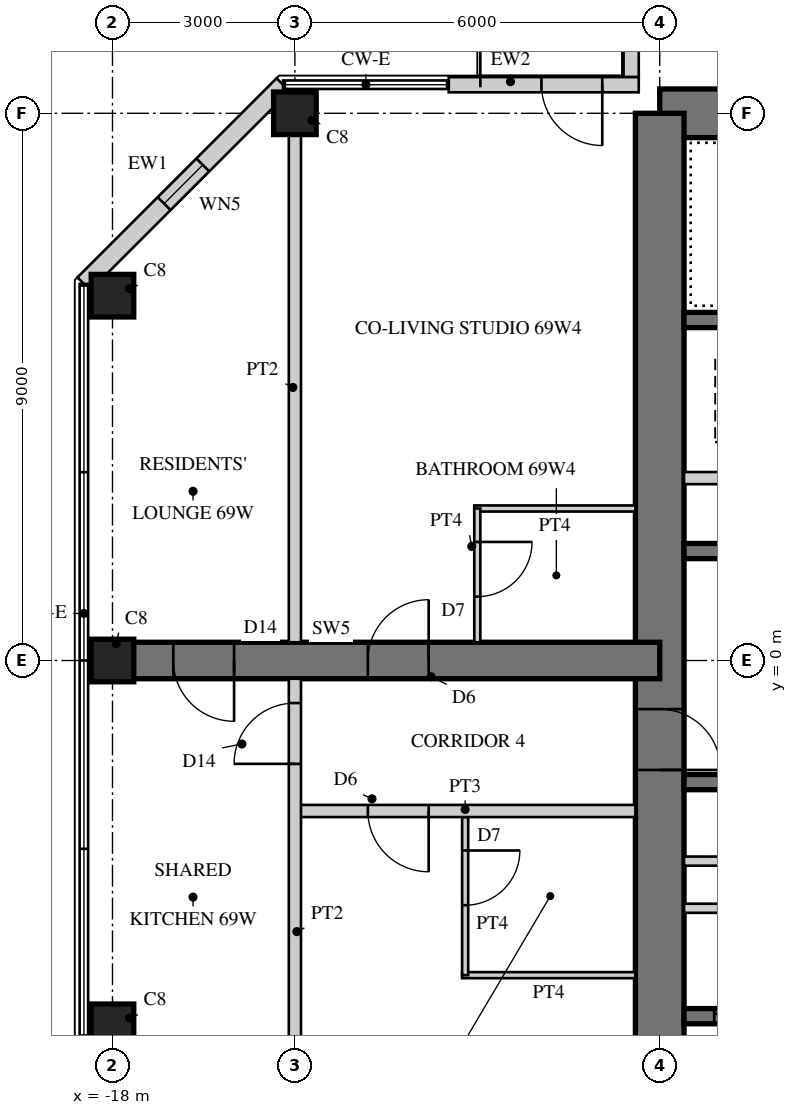
"""IFC4 building model, lengths in metres.
Left out: names, types, materials, properties, quantities, classifications, styles, units other than length and angle.
Written with IfcOpenShell. Run it as: python <this file> out.ifc"""

import sys

from ifc_helpers import new_model, si_unit, direction, frame, frame_2d, origin, origin_2d, place, context, subcontext, project, spatial, rectangle, hollow_rectangle, extrude, element, fill, save


model = new_model("IFC4")
c1 = context("Model", 3, precision=1e-05, world=origin(), true_north=direction((0.0, 1.0)))
c2 = subcontext(c1, "Body", "Model", "MODEL_VIEW")
j1 = project(units=[si_unit("LENGTHUNIT", "METRE"), si_unit("PLANEANGLEUNIT", "RADIAN")], contexts=[c1])
p1 = place(None, origin())
s1 = spatial("IfcSite", under=j1, at=p1, CompositionType="ELEMENT")
p2 = place(p1, origin())
s2 = spatial("IfcBuilding", under=s1, at=p2, CompositionType="ELEMENT")
p3 = place(p2, frame((0.0, 0.0, 267.9)))
s3 = spatial("IfcBuildingStorey", under=s2, at=p3, CompositionType="ELEMENT", Elevation=267.9)
p4 = place(p3, frame((9.0, 9.0, 0.0), z_axis=(0.0, 0.0, 1.0), x_axis=(-1.0, 0.0, 0.0)))
e1 = element("IfcWall", 1, at=p4, inside=s3, PredefinedType="SHEAR", context=c2, shape_type="SweptSolid", body=[
    extrude(rectangle(XDim=18.0, YDim=0.8, at=frame_2d((9.0, 0.0))), origin(), (0.0, 0.0, 1.0), 3.4),
])
p5 = place(p4, frame((9.8, 0.0, 0.0)))
e2 = element("IfcOpeningElement", 2, at=p5, cuts=e1, PredefinedType="OPENING", context=c2, shape_type="SweptSolid", body=[
    extrude(rectangle(XDim=1.0, YDim=2.4, at=frame_2d((0.5, 1.2))), frame((0.0, 0.41, 0.0), z_axis=(0.0, -1.0, 0.0), x_axis=(1.0, 0.0, 0.0)), (0.0, 0.0, 1.0), 0.82),
])
p6 = place(p3, frame((-9.0, 9.0, 0.0), z_axis=(0.0, 0.0, 1.0), x_axis=(0.0, -1.0, 0.0)))
e3 = element("IfcWall", 3, at=p6, inside=s3, PredefinedType="SHEAR", context=c2, shape_type="SweptSolid", body=[
    extrude(rectangle(XDim=18.0, YDim=0.8, at=frame_2d((9.0, 0.0))), origin(), (0.0, 0.0, 1.0), 3.4),
])
p7 = place(p6, frame((9.8, 0.0, 0.0)))
e4 = element("IfcOpeningElement", 4, at=p7, cuts=e3, PredefinedType="OPENING", context=c2, shape_type="SweptSolid", body=[
    extrude(rectangle(XDim=1.0, YDim=2.4, at=frame_2d((0.5, 1.2))), frame((0.0, 0.41, 0.0), z_axis=(0.0, -1.0, 0.0), x_axis=(1.0, 0.0, 0.0)), (0.0, 0.0, 1.0), 0.82),
])
p8 = place(p3, frame((-2.125, 1.8, 0.0), z_axis=(0.0, 0.0, 1.0), x_axis=(-1.0, 0.0, 0.0)))
e5 = element("IfcWall", 5, at=p8, inside=s3, PredefinedType="SHEAR", context=c2, shape_type="SweptSolid", body=[
    extrude(rectangle(XDim=6.475, YDim=0.25, at=frame_2d((3.238, 0.0))), origin(), (0.0, 0.0, 1.0), 3.4),
])
p9 = place(p3, frame((-2.125, 5.6, 0.0), z_axis=(0.0, 0.0, 1.0), x_axis=(-1.0, 0.0, 0.0)))
e6 = element("IfcWall", 6, at=p9, inside=s3, PredefinedType="SHEAR", context=c2, shape_type="SweptSolid", body=[
    extrude(rectangle(XDim=6.475, YDim=0.25, at=frame_2d((3.238, 0.0))), origin(), (0.0, 0.0, 1.0), 3.4),
])
p10 = place(p9, frame((0.175, 0.0, 0.0)))
e7 = element("IfcOpeningElement", 7, at=p10, cuts=e6, PredefinedType="OPENING", context=c2, shape_type="SweptSolid", body=[
    extrude(rectangle(XDim=1.0, YDim=2.1, at=frame_2d((0.5, 1.05))), frame((0.0, 0.135, 0.0), z_axis=(0.0, -1.0, 0.0), x_axis=(1.0, 0.0, 0.0)), (0.0, 0.0, 1.0), 0.27),
])
p11 = place(p3, frame((-5.725, 3.0, 0.0), z_axis=(0.0, 0.0, 1.0), x_axis=(-1.0, 0.0, 0.0)))
e8 = element("IfcWall", 8, at=p11, inside=s3, PredefinedType="PARTITIONING", context=c2, shape_type="SweptSolid", body=[
    extrude(rectangle(XDim=2.875, YDim=0.2, at=frame_2d((1.438, 0.0))), origin(), (0.0, 0.0, 1.0), 3.4),
])
p12 = place(p3, frame((-1.925, -2.0, 0.0), z_axis=(0.0, 0.0, 1.0), x_axis=(-1.0, 0.0, 0.0)))
e9 = element("IfcWall", 9, at=p12, inside=s3, PredefinedType="SHEAR", context=c2, shape_type="SweptSolid", body=[
    extrude(rectangle(XDim=6.675, YDim=0.25, at=frame_2d((3.337, 0.0))), origin(), (0.0, 0.0, 1.0), 3.4),
])
p13 = place(p3, frame((-1.925, -5.85, 0.0), z_axis=(0.0, 0.0, 1.0), x_axis=(-1.0, 0.0, 0.0)))
e10 = element("IfcWall", 10, at=p13, inside=s3, PredefinedType="SHEAR", context=c2, shape_type="SweptSolid", body=[
    extrude(rectangle(XDim=6.675, YDim=0.25, at=frame_2d((3.337, 0.0))), origin(), (0.0, 0.0, 1.0), 3.4),
])
p14 = place(p13, frame((0.496, 0.0, 0.0)))
e11 = element("IfcOpeningElement", 11, at=p14, cuts=e10, PredefinedType="OPENING", context=c2, shape_type="SweptSolid", body=[
    extrude(rectangle(XDim=1.1, YDim=2.2, at=frame_2d((0.55, 1.1))), frame((0.0, 0.135, 0.0), z_axis=(0.0, -1.0, 0.0), x_axis=(1.0, 0.0, 0.0)), (0.0, 0.0, 1.0), 0.27),
])
p15 = place(p13, frame((2.788, 0.0, 0.0)))
e12 = element("IfcOpeningElement", 12, at=p15, cuts=e10, PredefinedType="OPENING", context=c2, shape_type="SweptSolid", body=[
    extrude(rectangle(XDim=1.1, YDim=2.2, at=frame_2d((0.55, 1.1))), frame((0.0, 0.135, 0.0), z_axis=(0.0, -1.0, 0.0), x_axis=(1.0, 0.0, 0.0)), (0.0, 0.0, 1.0), 0.27),
])
p16 = place(p13, frame((5.079, 0.0, 0.0)))
e13 = element("IfcOpeningElement", 13, at=p16, cuts=e10, PredefinedType="OPENING", context=c2, shape_type="SweptSolid", body=[
    extrude(rectangle(XDim=1.1, YDim=2.2, at=frame_2d((0.55, 1.1))), frame((0.0, 0.135, 0.0), z_axis=(0.0, -1.0, 0.0), x_axis=(1.0, 0.0, 0.0)), (0.0, 0.0, 1.0), 0.27),
])
p17 = place(p3, frame((-1.925, -3.3, 0.0), z_axis=(0.0, 0.0, 1.0), x_axis=(-1.0, 0.0, 0.0)))
e14 = element("IfcWall", 14, at=p17, inside=s3, PredefinedType="PARTITIONING", context=c2, shape_type="SweptSolid", body=[
    extrude(rectangle(XDim=6.675, YDim=0.15, at=frame_2d((3.337, 0.0))), origin(), (0.0, 0.0, 1.0), 3.4),
])
p18 = place(p17, frame((0.075, 0.0, 0.0)))
e15 = element("IfcOpeningElement", 15, at=p18, cuts=e14, PredefinedType="OPENING", context=c2, shape_type="SweptSolid", body=[
    extrude(rectangle(XDim=0.8, YDim=2.1, at=frame_2d((0.4, 1.05))), frame((0.0, 0.085, 0.0), z_axis=(0.0, -1.0, 0.0), x_axis=(1.0, 0.0, 0.0)), (0.0, 0.0, 1.0), 0.17),
])
p19 = place(p17, frame((3.675, 0.0, 0.0)))
e16 = element("IfcOpeningElement", 16, at=p19, cuts=e14, PredefinedType="OPENING", context=c2, shape_type="SweptSolid", body=[
    extrude(rectangle(XDim=0.8, YDim=2.1, at=frame_2d((0.4, 1.05))), frame((0.0, 0.085, 0.0), z_axis=(0.0, -1.0, 0.0), x_axis=(1.0, 0.0, 0.0)), (0.0, 0.0, 1.0), 0.17),
])
p20 = place(p3, frame((-9.0, 0.0, 0.0), z_axis=(0.0, 0.0, 1.0), x_axis=(-1.0, 0.0, 0.0)))
e17 = element("IfcWall", 17, at=p20, inside=s3, PredefinedType="SHEAR", context=c2, shape_type="SweptSolid", body=[
    extrude(rectangle(XDim=9.0, YDim=0.6, at=frame_2d((4.5, 0.0))), origin(), (0.0, 0.0, 1.0), 3.4),
])
p21 = place(p20, frame((3.8, 0.0, 0.0)))
e18 = element("IfcOpeningElement", 18, at=p21, cuts=e17, PredefinedType="OPENING", context=c2, shape_type="SweptSolid", body=[
    extrude(rectangle(XDim=1.0, YDim=2.15, at=frame_2d((0.5, 1.075))), frame((0.0, 0.31, 0.0), z_axis=(0.0, -1.0, 0.0), x_axis=(1.0, 0.0, 0.0)), (0.0, 0.0, 1.0), 0.62),
])
p22 = place(p20, frame((7.0, 0.0, 0.0)))
e19 = element("IfcOpeningElement", 19, at=p22, cuts=e17, PredefinedType="OPENING", context=c2, shape_type="SweptSolid", body=[
    extrude(rectangle(XDim=1.0, YDim=2.2, at=frame_2d((0.5, 1.1))), frame((0.0, 0.31, 0.0), z_axis=(0.0, -1.0, 0.0), x_axis=(1.0, 0.0, 0.0)), (0.0, 0.0, 1.0), 0.62),
])
for number, where, z_axis, x_axis in (
    (20, (-15.0, 9.0, 0.0), (0.0, 0.0, 1.0), (1.0, 0.0, 0.0)),
    (21, (-18.0, 6.0, 0.0), (0.0, 0.0, 1.0), (1.0, 0.0, 0.0)),
    (22, (-18.0, 0.0, 0.0), (0.0, 0.0, 1.0), (1.0, 0.0, 0.0)),
    (23, (-18.0, -6.0, 0.0), (0.0, 0.0, 1.0), (1.0, 0.0, 0.0)),
):
    element("IfcColumn", number, at=place(p3, frame(where, z_axis=z_axis, x_axis=x_axis)), inside=s3, PredefinedType="COLUMN", context=c2, shape_type="SweptSolid", body=[
        extrude(rectangle(XDim=0.7, YDim=0.7, at=origin_2d()), origin(), (0.0, 0.0, 1.0), 3.4),
    ])
p23 = place(p3, frame((-9.47, 12.47, 0.0), z_axis=(0.0, 0.0, 1.0), x_axis=(0.0, -1.0, 0.0)))
e24 = element("IfcWall", 24, at=p23, inside=s3, PredefinedType="SOLIDWALL", context=c2, shape_type="SweptSolid", body=[
    extrude(rectangle(XDim=2.875, YDim=0.25, at=frame_2d((1.438, 0.0))), origin(), (0.0, 0.0, 1.0), 3.22),
])
p24 = place(p23, frame((0.6, 0.0, 0.0)))
e25 = element("IfcOpeningElement", 25, at=p24, cuts=e24, PredefinedType="OPENING", context=c2, shape_type="SweptSolid", body=[
    extrude(rectangle(XDim=1.0, YDim=2.2, at=frame_2d((0.5, 1.1))), frame((0.0, 0.135, 0.0), z_axis=(0.0, -1.0, 0.0), x_axis=(1.0, 0.0, 0.0)), (0.0, 0.0, 1.0), 0.27),
])
p25 = place(p3, frame((-9.345, 9.47, 0.0), z_axis=(0.0, 0.0, 1.0), x_axis=(-1.0, 0.0, 0.0)))
e26 = element("IfcWall", 26, at=p25, inside=s3, PredefinedType="SOLIDWALL", context=c2, shape_type="SweptSolid", body=[
    extrude(rectangle(XDim=3.125, YDim=0.25, at=frame_2d((1.562, 0.0))), origin(), (0.0, 0.0, 1.0), 3.22),
])
p26 = place(p25, frame((0.6, 0.0, 0.0)))
e27 = element("IfcOpeningElement", 27, at=p26, cuts=e26, PredefinedType="OPENING", context=c2, shape_type="SweptSolid", body=[
    extrude(rectangle(XDim=1.0, YDim=2.2, at=frame_2d((0.5, 1.1))), frame((0.0, 0.135, 0.0), z_axis=(0.0, -1.0, 0.0), x_axis=(1.0, 0.0, 0.0)), (0.0, 0.0, 1.0), 0.27),
])
p27 = place(p3, frame((-15.195, 9.47, 0.0), z_axis=(0.0, 0.0, 1.0), x_axis=(-0.707106781187, -0.707106781187, 0.0)))
e28 = element("IfcWall", 28, at=p27, inside=s3, PredefinedType="SOLIDWALL", context=c2, shape_type="SweptSolid", body=[
    extrude(rectangle(XDim=4.632, YDim=0.3, at=frame_2d((2.316, 0.0))), origin(), (0.0, 0.0, 1.0), 3.22),
])
p28 = place(p27, frame((1.866, 0.0, 0.3)))
e29 = element("IfcOpeningElement", 29, at=p28, cuts=e28, PredefinedType="OPENING", context=c2, shape_type="SweptSolid", body=[
    extrude(rectangle(XDim=0.9, YDim=2.4, at=frame_2d((0.45, 1.2))), frame((0.0, 0.16, 0.0), z_axis=(0.0, -1.0, 0.0), x_axis=(1.0, 0.0, 0.0)), (0.0, 0.0, 1.0), 0.32),
])
p29 = place(p3, frame((-18.47, -6.195, 0.0), z_axis=(0.0, 0.0, 1.0), x_axis=(0.707106781187, -0.707106781187, 0.0)))
e30 = element("IfcWall", 30, at=p29, inside=s3, PredefinedType="SOLIDWALL", context=c2, shape_type="SweptSolid", body=[
    extrude(rectangle(XDim=4.632, YDim=0.3, at=frame_2d((2.316, 0.0))), origin(), (0.0, 0.0, 1.0), 3.22),
])
p30 = place(p29, frame((1.866, 0.0, 0.3)))
e31 = element("IfcOpeningElement", 31, at=p30, cuts=e30, PredefinedType="OPENING", context=c2, shape_type="SweptSolid", body=[
    extrude(rectangle(XDim=0.9, YDim=2.4, at=frame_2d((0.45, 1.2))), frame((0.0, 0.16, 0.0), z_axis=(0.0, -1.0, 0.0), x_axis=(1.0, 0.0, 0.0)), (0.0, 0.0, 1.0), 0.32),
])
p31 = place(p3, frame((-3.325, -4.075, 0.0), z_axis=(0.0, 0.0, 1.0), x_axis=(-1.0, 0.0, 0.0)))
e32 = element("IfcWall", 32, at=p31, inside=s3, PredefinedType="PARTITIONING", context=c2, shape_type="SweptSolid", body=[
    extrude(rectangle(XDim=5.275, YDim=0.15, at=frame_2d((2.638, 0.0))), origin(), (0.0, 0.0, 1.0), 3.22),
])
p32 = place(p31, frame((2.137, 0.0, 0.0)))
e33 = element("IfcOpeningElement", 33, at=p32, cuts=e32, PredefinedType="OPENING", context=c2, shape_type="SweptSolid", body=[
    extrude(rectangle(XDim=1.0, YDim=2.1, at=frame_2d((0.5, 1.05))), frame((0.0, 0.085, 0.0), z_axis=(0.0, -1.0, 0.0), x_axis=(1.0, 0.0, 0.0)), (0.0, 0.0, 1.0), 0.17),
])
p33 = place(p3, frame((-9.4, -5.175, 0.0), z_axis=(0.0, 0.0, 1.0), x_axis=(-1.0, 0.0, 0.0)))
e34 = element("IfcWall", 34, at=p33, inside=s3, PredefinedType="PARTITIONING", context=c2, shape_type="SweptSolid", body=[
    extrude(rectangle(XDim=2.85, YDim=0.1, at=frame_2d((1.425, 0.0))), origin(), (0.0, 0.0, 1.0), 3.22),
])
p34 = place(p3, frame((-12.2, -2.575, 0.0), z_axis=(0.0, 0.0, 1.0), x_axis=(0.0, -1.0, 0.0)))
e35 = element("IfcWall", 35, at=p34, inside=s3, PredefinedType="PARTITIONING", context=c2, shape_type="SweptSolid", body=[
    extrude(rectangle(XDim=2.6, YDim=0.1, at=frame_2d((1.3, 0.0))), origin(), (0.0, 0.0, 1.0), 3.22),
])
p35 = place(p34, frame((0.55, 0.0, 0.0)))
e36 = element("IfcOpeningElement", 36, at=p35, cuts=e35, PredefinedType="OPENING", context=c2, shape_type="SweptSolid", body=[
    extrude(rectangle(XDim=0.9, YDim=2.1, at=frame_2d((0.45, 1.05))), frame((0.0, 0.06, 0.0), z_axis=(0.0, -1.0, 0.0), x_axis=(1.0, 0.0, 0.0)), (0.0, 0.0, 1.0), 0.12),
])
p36 = place(p3, frame((-9.4, 2.5, 0.0), z_axis=(0.0, 0.0, 1.0), x_axis=(-1.0, 0.0, 0.0)))
e37 = element("IfcWall", 37, at=p36, inside=s3, PredefinedType="PARTITIONING", context=c2, shape_type="SweptSolid", body=[
    extrude(rectangle(XDim=2.65, YDim=0.1, at=frame_2d((1.325, 0.0))), origin(), (0.0, 0.0, 1.0), 3.22),
])
p37 = place(p3, frame((-12.0, 2.5, 0.0), z_axis=(0.0, 0.0, 1.0), x_axis=(0.0, -1.0, 0.0)))
e38 = element("IfcWall", 38, at=p37, inside=s3, PredefinedType="PARTITIONING", context=c2, shape_type="SweptSolid", body=[
    extrude(rectangle(XDim=2.2, YDim=0.1, at=frame_2d((1.1, 0.0))), origin(), (0.0, 0.0, 1.0), 3.22),
])
p38 = place(p37, frame((0.55, 0.0, 0.0)))
e39 = element("IfcOpeningElement", 39, at=p38, cuts=e38, PredefinedType="OPENING", context=c2, shape_type="SweptSolid", body=[
    extrude(rectangle(XDim=0.9, YDim=2.1, at=frame_2d((0.45, 1.05))), frame((0.0, 0.06, 0.0), z_axis=(0.0, -1.0, 0.0), x_axis=(1.0, 0.0, 0.0)), (0.0, 0.0, 1.0), 0.12),
])
p39 = place(p3, frame((-9.4, -2.475, 0.0), z_axis=(0.0, 0.0, 1.0), x_axis=(-1.0, 0.0, 0.0)))
e40 = element("IfcWall", 40, at=p39, inside=s3, PredefinedType="SOLIDWALL", context=c2, shape_type="SweptSolid", body=[
    extrude(rectangle(XDim=5.6, YDim=0.2, at=frame_2d((2.8, 0.0))), origin(), (0.0, 0.0, 1.0), 3.22),
])
p40 = place(p39, frame((3.4, 0.0, 0.0)))
e41 = element("IfcOpeningElement", 41, at=p40, cuts=e40, PredefinedType="OPENING", context=c2, shape_type="SweptSolid", body=[
    extrude(rectangle(XDim=1.0, YDim=2.15, at=frame_2d((0.5, 1.075))), frame((0.0, 0.11, 0.0), z_axis=(0.0, -1.0, 0.0), x_axis=(1.0, 0.0, 0.0)), (0.0, 0.0, 1.0), 0.22),
])
p41 = place(p3, frame((-15.0, 8.65, 0.0), z_axis=(0.0, 0.0, 1.0), x_axis=(0.0, -1.0, 0.0)))
e42 = element("IfcWall", 42, at=p41, inside=s3, PredefinedType="SOLIDWALL", context=c2, shape_type="SweptSolid", body=[
    extrude(rectangle(XDim=8.35, YDim=0.2, at=frame_2d((4.175, 0.0))), origin(), (0.0, 0.0, 1.0), 2.52),
])
p42 = place(p3, frame((-15.0, -0.3, 0.0), z_axis=(0.0, 0.0, 1.0), x_axis=(0.0, -1.0, 0.0)))
e43 = element("IfcWall", 43, at=p42, inside=s3, PredefinedType="SOLIDWALL", context=c2, shape_type="SweptSolid", body=[
    extrude(rectangle(XDim=8.35, YDim=0.2, at=frame_2d((4.175, 0.0))), origin(), (0.0, 0.0, 1.0), 2.52),
])
p43 = place(p42, frame((0.4, 0.0, 0.0)))
e44 = element("IfcOpeningElement", 44, at=p43, cuts=e43, PredefinedType="OPENING", context=c2, shape_type="SweptSolid", body=[
    extrude(rectangle(XDim=1.0, YDim=2.2, at=frame_2d((0.5, 1.1))), frame((0.0, 0.11, 0.0), z_axis=(0.0, -1.0, 0.0), x_axis=(1.0, 0.0, 0.0)), (0.0, 0.0, 1.0), 0.22),
])
p44 = place(p26, origin())
e45 = element("IfcDoor", 45, at=p44, inside=s3, OperationType="SINGLE_SWING_LEFT", PredefinedType="DOOR", context=c2, shape_type="SweptSolid", body=[
    extrude(hollow_rectangle(XDim=1.0, YDim=2.2, WallThickness=0.06, at=frame_2d((0.5, 1.1))), frame((0.0, 0.025, 0.0), z_axis=(0.0, -1.0, 0.0), x_axis=(1.0, 0.0, 0.0)), (0.0, 0.0, 1.0), 0.05),
    extrude(rectangle(XDim=0.879, YDim=2.079, at=frame_2d((0.5, 1.1))), frame((0.0, 0.025, 0.0), z_axis=(0.0, -1.0, 0.0), x_axis=(1.0, 0.0, 0.0)), (0.0, 0.0, 1.0), 0.05),
])
fill(e27, e45)
p45 = place(p28, origin())
e46 = element("IfcWindow", 46, at=p45, inside=s3, PartitioningType="SINGLE_PANEL", PredefinedType="WINDOW", context=c2, shape_type="SweptSolid", body=[
    extrude(hollow_rectangle(XDim=0.9, YDim=2.4, WallThickness=0.06, at=frame_2d((0.45, 1.2))), frame((0.0, 0.03, 0.0), z_axis=(0.0, -1.0, 0.0), x_axis=(1.0, 0.0, 0.0)), (0.0, 0.0, 1.0), 0.06),
    extrude(rectangle(XDim=0.779, YDim=2.279, at=frame_2d((0.45, 1.2))), frame((0.0, 0.03, 0.0), z_axis=(0.0, -1.0, 0.0), x_axis=(1.0, 0.0, 0.0)), (0.0, 0.0, 1.0), 0.06),
])
fill(e29, e46)
p46 = place(p35, origin())
e47 = element("IfcDoor", 47, at=p46, inside=s3, OperationType="SINGLE_SWING_LEFT", PredefinedType="DOOR", context=c2, shape_type="SweptSolid", body=[
    extrude(rectangle(XDim=0.9, YDim=2.1, at=frame_2d((0.45, 1.05))), frame((0.0, 0.025, 0.0), z_axis=(0.0, -1.0, 0.0), x_axis=(1.0, 0.0, 0.0)), (0.0, 0.0, 1.0), 0.05),
])
fill(e36, e47)
p47 = place(p38, origin())
e48 = element("IfcDoor", 48, at=p47, inside=s3, OperationType="SINGLE_SWING_LEFT", PredefinedType="DOOR", context=c2, shape_type="SweptSolid", body=[
    extrude(rectangle(XDim=0.9, YDim=2.1, at=frame_2d((0.45, 1.05))), frame((0.0, 0.025, 0.0), z_axis=(0.0, -1.0, 0.0), x_axis=(1.0, 0.0, 0.0)), (0.0, 0.0, 1.0), 0.05),
])
fill(e39, e48)
p48 = place(p40, origin())
e49 = element("IfcDoor", 49, at=p48, inside=s3, OperationType="SINGLE_SWING_LEFT", PredefinedType="DOOR", context=c2, shape_type="SweptSolid", body=[
    extrude(rectangle(XDim=1.0, YDim=2.15, at=frame_2d((0.5, 1.075))), frame((0.0, 0.025, 0.0), z_axis=(0.0, -1.0, 0.0), x_axis=(1.0, 0.0, 0.0)), (0.0, 0.0, 1.0), 0.05),
])
fill(e41, e49)
p49 = place(p43, frame((1.0, 0.0, 0.0), z_axis=(0.0, 0.0, 1.0), x_axis=(-1.0, 0.0, 0.0)))
e50 = element("IfcDoor", 50, at=p49, inside=s3, OperationType="SINGLE_SWING_LEFT", PredefinedType="DOOR", context=c2, shape_type="SweptSolid", body=[
    extrude(rectangle(XDim=1.0, YDim=2.2, at=frame_2d((0.5, 1.1))), frame((0.0, 0.025, 0.0), z_axis=(0.0, -1.0, 0.0), x_axis=(1.0, 0.0, 0.0)), (0.0, 0.0, 1.0), 0.05),
])
fill(e44, e50)
p50 = place(p21, frame((1.0, 0.0, 0.0), z_axis=(0.0, 0.0, 1.0), x_axis=(-1.0, 0.0, 0.0)))
e51 = element("IfcDoor", 51, at=p50, inside=s3, OperationType="SINGLE_SWING_RIGHT", PredefinedType="DOOR", context=c2, shape_type="SweptSolid", body=[
    extrude(rectangle(XDim=1.0, YDim=2.15, at=frame_2d((0.5, 1.075))), frame((0.0, 0.025, 0.0), z_axis=(0.0, -1.0, 0.0), x_axis=(1.0, 0.0, 0.0)), (0.0, 0.0, 1.0), 0.05),
])
fill(e18, e51)
p51 = place(p22, origin())
e52 = element("IfcDoor", 52, at=p51, inside=s3, OperationType="SINGLE_SWING_LEFT", PredefinedType="DOOR", context=c2, shape_type="SweptSolid", body=[
    extrude(rectangle(XDim=1.0, YDim=2.2, at=frame_2d((0.5, 1.1))), frame((0.0, 0.025, 0.0), z_axis=(0.0, -1.0, 0.0), x_axis=(1.0, 0.0, 0.0)), (0.0, 0.0, 1.0), 0.05),
])
fill(e19, e52)
p52 = place(p7, origin())
e53 = element("IfcDoor", 53, at=p52, inside=s3, OperationType="SINGLE_SWING_RIGHT", PredefinedType="DOOR", context=c2, shape_type="SweptSolid", body=[
    extrude(rectangle(XDim=1.0, YDim=2.4, at=frame_2d((0.5, 1.2))), frame((0.0, 0.055, 0.0), z_axis=(0.0, -1.0, 0.0), x_axis=(1.0, 0.0, 0.0)), (0.0, 0.0, 1.0), 0.05),
])
fill(e4, e53)
p53 = place(p16, origin())
e54 = element("IfcDoor", 54, at=p53, inside=s3, OperationType="DOUBLE_DOOR_SLIDING", PredefinedType="DOOR", context=c2, shape_type="SweptSolid", body=[
    extrude(rectangle(XDim=1.1, YDim=2.2, at=frame_2d((0.55, 1.1))), frame((0.0, 0.025, 0.0), z_axis=(0.0, -1.0, 0.0), x_axis=(1.0, 0.0, 0.0)), (0.0, 0.0, 1.0), 0.05),
])
fill(e13, e54)
save(model, sys.argv[1])
